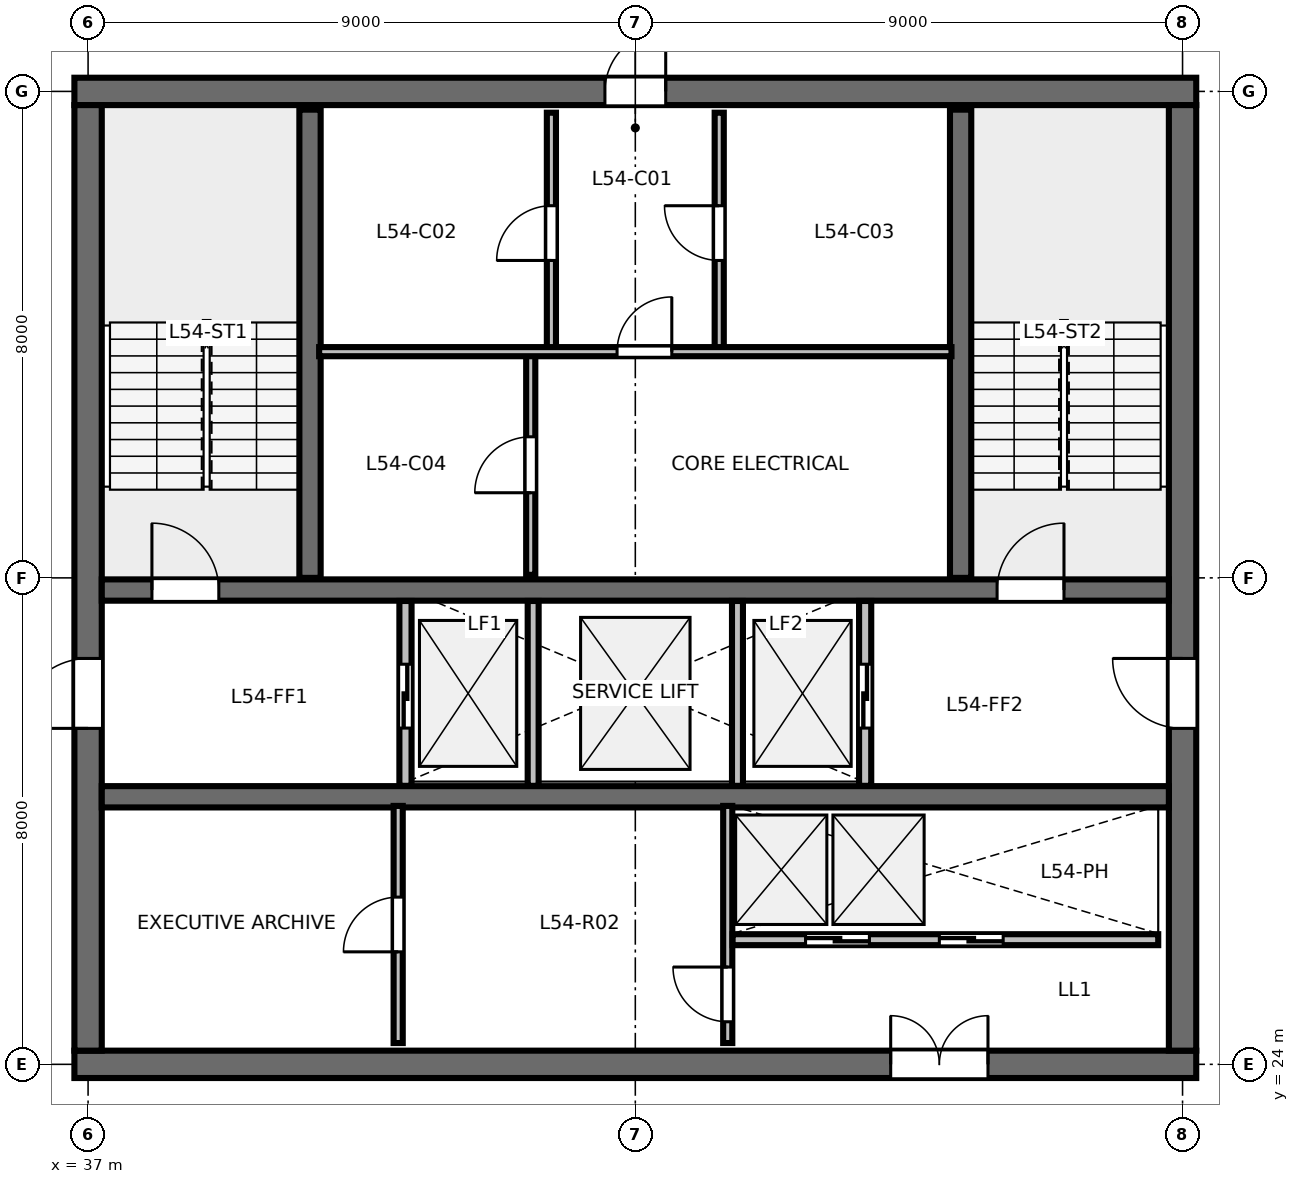
"""IFC4 building model, lengths in metres.
Left out: names, types, materials, properties, quantities, classifications, styles, units other than length and angle.
Written with IfcOpenShell. Run it as: python <this file> out.ifc"""

import sys

from ifc_helpers import new_model, si_unit, direction, frame, frame_2d, origin, place, context, subcontext, project, spatial, rectangle, extrude, element, fill, save


model = new_model("IFC4")
c1 = context("Model", 3, precision=1e-05, world=origin(), true_north=direction((0.0, 1.0)))
c2 = subcontext(c1, "Body", "Model", "MODEL_VIEW")
j1 = project(units=[si_unit("LENGTHUNIT", "METRE"), si_unit("PLANEANGLEUNIT", "RADIAN")], contexts=[c1])
p1 = place(None, origin())
s1 = spatial("IfcSite", under=j1, at=p1, CompositionType="ELEMENT")
p2 = place(p1, origin())
s2 = spatial("IfcBuilding", under=s1, at=p2, CompositionType="ELEMENT")
p3 = place(p2, frame((0.0, 0.0, 205.8)))
s3 = spatial("IfcBuildingStorey", under=s2, at=p3, CompositionType="ELEMENT", Elevation=205.8)
p4 = place(p3, frame((36.775, 24.0, 0.0), z_axis=(0.0, 0.0, 1.0), x_axis=(1.0, 0.0, 0.0)))
e1 = element("IfcWall", 1, at=p4, inside=s3, PredefinedType="SHEAR", context=c2, shape_type="SweptSolid", body=[
    extrude(rectangle(XDim=18.45, YDim=0.45, at=frame_2d((9.225, 0.0))), origin(), (0.0, 0.0, 1.0), 3.36),
])
p5 = place(p4, frame((13.425, 0.0, 0.0)))
e2 = element("IfcOpeningElement", 2, at=p5, cuts=e1, PredefinedType="OPENING", context=c2, shape_type="SweptSolid", body=[
    extrude(rectangle(XDim=1.6, YDim=2.15, at=frame_2d((0.8, 1.075))), frame((0.0, 0.235, 0.0), z_axis=(0.0, -1.0, 0.0), x_axis=(1.0, 0.0, 0.0)), (0.0, 0.0, 1.0), 0.47),
])
p6 = place(p3, frame((36.775, 40.0, 0.0), z_axis=(0.0, 0.0, 1.0), x_axis=(1.0, 0.0, 0.0)))
e3 = element("IfcWall", 3, at=p6, inside=s3, PredefinedType="SHEAR", context=c2, shape_type="SweptSolid", body=[
    extrude(rectangle(XDim=18.45, YDim=0.45, at=frame_2d((9.225, 0.0))), origin(), (0.0, 0.0, 1.0), 3.36),
])
p7 = place(p6, frame((8.725, 0.0, 0.0)))
e4 = element("IfcOpeningElement", 4, at=p7, cuts=e3, PredefinedType="OPENING", context=c2, shape_type="SweptSolid", body=[
    extrude(rectangle(XDim=1.0, YDim=2.15, at=frame_2d((0.5, 1.075))), frame((0.0, 0.235, 0.0), z_axis=(0.0, -1.0, 0.0), x_axis=(1.0, 0.0, 0.0)), (0.0, 0.0, 1.0), 0.47),
])
p8 = place(p3, frame((37.0, 24.225, 0.0), z_axis=(0.0, 0.0, 1.0), x_axis=(0.0, 1.0, 0.0)))
e5 = element("IfcWall", 5, at=p8, inside=s3, PredefinedType="SHEAR", context=c2, shape_type="SweptSolid", body=[
    extrude(rectangle(XDim=15.55, YDim=0.45, at=frame_2d((7.775, 0.0))), origin(), (0.0, 0.0, 1.0), 3.36),
])
p9 = place(p8, frame((5.3, 0.0, 0.0)))
e6 = element("IfcOpeningElement", 6, at=p9, cuts=e5, PredefinedType="OPENING", context=c2, shape_type="SweptSolid", body=[
    extrude(rectangle(XDim=1.15, YDim=2.15, at=frame_2d((0.575, 1.075))), frame((0.0, 0.235, 0.0), z_axis=(0.0, -1.0, 0.0), x_axis=(1.0, 0.0, 0.0)), (0.0, 0.0, 1.0), 0.47),
])
p10 = place(p3, frame((55.0, 24.225, 0.0), z_axis=(0.0, 0.0, 1.0), x_axis=(0.0, 1.0, 0.0)))
e7 = element("IfcWall", 7, at=p10, inside=s3, PredefinedType="SHEAR", context=c2, shape_type="SweptSolid", body=[
    extrude(rectangle(XDim=15.55, YDim=0.45, at=frame_2d((7.775, 0.0))), origin(), (0.0, 0.0, 1.0), 3.36),
])
p11 = place(p10, frame((5.3, 0.0, 0.0)))
e8 = element("IfcOpeningElement", 8, at=p11, cuts=e7, PredefinedType="OPENING", context=c2, shape_type="SweptSolid", body=[
    extrude(rectangle(XDim=1.15, YDim=2.15, at=frame_2d((0.575, 1.075))), frame((0.0, 0.235, 0.0), z_axis=(0.0, -1.0, 0.0), x_axis=(1.0, 0.0, 0.0)), (0.0, 0.0, 1.0), 0.47),
])
p12 = place(p3, frame((37.225, 31.8, 0.0), z_axis=(0.0, 0.0, 1.0), x_axis=(1.0, 0.0, 0.0)))
e9 = element("IfcWall", 9, at=p12, inside=s3, PredefinedType="SHEAR", context=c2, shape_type="SweptSolid", body=[
    extrude(rectangle(XDim=17.55, YDim=0.35, at=frame_2d((8.775, 0.0))), origin(), (0.0, 0.0, 1.0), 3.36),
])
p13 = place(p12, frame((0.825, 0.0, 0.0)))
e10 = element("IfcOpeningElement", 10, at=p13, cuts=e9, PredefinedType="OPENING", context=c2, shape_type="SweptSolid", body=[
    extrude(rectangle(XDim=1.1, YDim=2.15, at=frame_2d((0.55, 1.075))), frame((0.0, 0.185, 0.0), z_axis=(0.0, -1.0, 0.0), x_axis=(1.0, 0.0, 0.0)), (0.0, 0.0, 1.0), 0.37),
])
p14 = place(p12, frame((14.725, 0.0, 0.0)))
e11 = element("IfcOpeningElement", 11, at=p14, cuts=e9, PredefinedType="OPENING", context=c2, shape_type="SweptSolid", body=[
    extrude(rectangle(XDim=1.1, YDim=2.15, at=frame_2d((0.55, 1.075))), frame((0.0, 0.185, 0.0), z_axis=(0.0, -1.0, 0.0), x_axis=(1.0, 0.0, 0.0)), (0.0, 0.0, 1.0), 0.37),
])
p15 = place(p3, frame((37.225, 28.4, 0.0), z_axis=(0.0, 0.0, 1.0), x_axis=(1.0, 0.0, 0.0)))
e12 = element("IfcWall", 12, at=p15, inside=s3, PredefinedType="SHEAR", context=c2, shape_type="SweptSolid", body=[
    extrude(rectangle(XDim=17.55, YDim=0.35, at=frame_2d((8.775, 0.0))), origin(), (0.0, 0.0, 1.0), 3.36),
])
for number, where, z_axis, x_axis in (
    (13, (40.65, 32.0, 0.0), (0.0, 0.0, 1.0), (0.0, 1.0, 0.0)),
    (14, (51.35, 32.0, 0.0), (0.0, 0.0, 1.0), (0.0, 1.0, 0.0)),
):
    element("IfcWall", number, at=place(p3, frame(where, z_axis=z_axis, x_axis=x_axis)), inside=s3, PredefinedType="SHEAR", context=c2, shape_type="SweptSolid", body=[
        extrude(rectangle(XDim=7.7, YDim=0.35, at=frame_2d((3.85, 0.0))), origin(), (0.0, 0.0, 1.0), 3.6),
    ])
p16 = place(p3, frame((44.62, 35.72, 0.0), z_axis=(0.0, 0.0, 1.0), x_axis=(0.0, 1.0, 0.0)))
e15 = element("IfcWall", 15, at=p16, inside=s3, PredefinedType="PARTITIONING", context=c2, shape_type="SweptSolid", body=[
    extrude(rectangle(XDim=3.93, YDim=0.15, at=frame_2d((1.965, 0.0))), origin(), (0.0, 0.0, 1.0), 3.375),
])
p17 = place(p16, frame((1.5, 0.0, 0.0)))
e16 = element("IfcOpeningElement", 16, at=p17, cuts=e15, PredefinedType="OPENING", context=c2, shape_type="SweptSolid", body=[
    extrude(rectangle(XDim=0.9, YDim=2.15, at=frame_2d((0.45, 1.075))), frame((0.0, 0.085, 0.0), z_axis=(0.0, -1.0, 0.0), x_axis=(1.0, 0.0, 0.0)), (0.0, 0.0, 1.0), 0.17),
])
p18 = place(p3, frame((47.38, 35.72, 0.0), z_axis=(0.0, 0.0, 1.0), x_axis=(0.0, 1.0, 0.0)))
e17 = element("IfcWall", 17, at=p18, inside=s3, PredefinedType="PARTITIONING", context=c2, shape_type="SweptSolid", body=[
    extrude(rectangle(XDim=3.93, YDim=0.15, at=frame_2d((1.965, 0.0))), origin(), (0.0, 0.0, 1.0), 3.375),
])
p19 = place(p18, frame((1.5, 0.0, 0.0)))
e18 = element("IfcOpeningElement", 18, at=p19, cuts=e17, PredefinedType="OPENING", context=c2, shape_type="SweptSolid", body=[
    extrude(rectangle(XDim=0.9, YDim=2.15, at=frame_2d((0.45, 1.075))), frame((0.0, 0.085, 0.0), z_axis=(0.0, -1.0, 0.0), x_axis=(1.0, 0.0, 0.0)), (0.0, 0.0, 1.0), 0.17),
])
p20 = place(p3, frame((44.28, 32.05, 0.0), z_axis=(0.0, 0.0, 1.0), x_axis=(0.0, 1.0, 0.0)))
e19 = element("IfcWall", 19, at=p20, inside=s3, PredefinedType="PARTITIONING", context=c2, shape_type="SweptSolid", body=[
    extrude(rectangle(XDim=3.67, YDim=0.15, at=frame_2d((1.835, 0.0))), origin(), (0.0, 0.0, 1.0), 3.375),
])
p21 = place(p20, frame((1.35, 0.0, 0.0)))
e20 = element("IfcOpeningElement", 20, at=p21, cuts=e19, PredefinedType="OPENING", context=c2, shape_type="SweptSolid", body=[
    extrude(rectangle(XDim=0.92, YDim=2.15, at=frame_2d((0.46, 1.075))), frame((0.0, 0.085, 0.0), z_axis=(0.0, -1.0, 0.0), x_axis=(1.0, 0.0, 0.0)), (0.0, 0.0, 1.0), 0.17),
])
p22 = place(p3, frame((40.8, 35.72, 0.0), z_axis=(0.0, 0.0, 1.0), x_axis=(1.0, 0.0, 0.0)))
e21 = element("IfcWall", 21, at=p22, inside=s3, PredefinedType="PARTITIONING", context=c2, shape_type="SweptSolid", body=[
    extrude(rectangle(XDim=10.4, YDim=0.15, at=frame_2d((5.2, 0.0))), origin(), (0.0, 0.0, 1.0), 3.375),
])
p23 = place(p22, frame((4.9, 0.0, 0.0)))
e22 = element("IfcOpeningElement", 22, at=p23, cuts=e21, PredefinedType="OPENING", context=c2, shape_type="SweptSolid", body=[
    extrude(rectangle(XDim=0.9, YDim=2.15, at=frame_2d((0.45, 1.075))), frame((0.0, 0.085, 0.0), z_axis=(0.0, -1.0, 0.0), x_axis=(1.0, 0.0, 0.0)), (0.0, 0.0, 1.0), 0.17),
])
p24 = place(p3, frame((42.22, 28.58, 0.0), z_axis=(0.0, 0.0, 1.0), x_axis=(0.0, 1.0, 0.0)))
e23 = element("IfcWall", 23, at=p24, inside=s3, PredefinedType="PARTITIONING", context=c2, shape_type="SweptSolid", body=[
    extrude(rectangle(XDim=3.04, YDim=0.2, at=frame_2d((1.52, 0.0))), origin(), (0.0, 0.0, 1.0), 3.375),
])
p25 = place(p24, frame((0.95, 0.0, 0.0)))
e24 = element("IfcOpeningElement", 24, at=p25, cuts=e23, PredefinedType="OPENING", context=c2, shape_type="SweptSolid", body=[
    extrude(rectangle(XDim=1.05, YDim=2.15, at=frame_2d((0.525, 1.075))), frame((0.0, 0.11, 0.0), z_axis=(0.0, -1.0, 0.0), x_axis=(1.0, 0.0, 0.0)), (0.0, 0.0, 1.0), 0.22),
])
p26 = place(p3, frame((49.78, 28.58, 0.0), z_axis=(0.0, 0.0, 1.0), x_axis=(0.0, 1.0, 0.0)))
e25 = element("IfcWall", 25, at=p26, inside=s3, PredefinedType="PARTITIONING", context=c2, shape_type="SweptSolid", body=[
    extrude(rectangle(XDim=3.04, YDim=0.2, at=frame_2d((1.52, 0.0))), origin(), (0.0, 0.0, 1.0), 3.375),
])
p27 = place(p26, frame((0.95, 0.0, 0.0)))
e26 = element("IfcOpeningElement", 26, at=p27, cuts=e25, PredefinedType="OPENING", context=c2, shape_type="SweptSolid", body=[
    extrude(rectangle(XDim=1.05, YDim=2.15, at=frame_2d((0.525, 1.075))), frame((0.0, 0.11, 0.0), z_axis=(0.0, -1.0, 0.0), x_axis=(1.0, 0.0, 0.0)), (0.0, 0.0, 1.0), 0.22),
])
for number, where, z_axis, x_axis in (
    (27, (44.32, 28.58, 0.0), (0.0, 0.0, 1.0), (0.0, 1.0, 0.0)),
    (28, (47.68, 28.58, 0.0), (0.0, 0.0, 1.0), (0.0, 1.0, 0.0)),
):
    element("IfcWall", number, at=place(p3, frame(where, z_axis=z_axis, x_axis=x_axis)), inside=s3, PredefinedType="PARTITIONING", context=c2, shape_type="SweptSolid", body=[
        extrude(rectangle(XDim=3.04, YDim=0.18, at=frame_2d((1.52, 0.0))), origin(), (0.0, 0.0, 1.0), 3.375),
    ])
p28 = place(p3, frame((42.1, 24.35, 0.0), z_axis=(0.0, 0.0, 1.0), x_axis=(0.0, 1.0, 0.0)))
e29 = element("IfcWall", 29, at=p28, inside=s3, PredefinedType="PARTITIONING", context=c2, shape_type="SweptSolid", body=[
    extrude(rectangle(XDim=3.9, YDim=0.15, at=frame_2d((1.95, 0.0))), origin(), (0.0, 0.0, 1.0), 3.375),
])
p29 = place(p28, frame((1.5, 0.0, 0.0)))
e30 = element("IfcOpeningElement", 30, at=p29, cuts=e29, PredefinedType="OPENING", context=c2, shape_type="SweptSolid", body=[
    extrude(rectangle(XDim=0.9, YDim=2.15, at=frame_2d((0.45, 1.075))), frame((0.0, 0.085, 0.0), z_axis=(0.0, -1.0, 0.0), x_axis=(1.0, 0.0, 0.0)), (0.0, 0.0, 1.0), 0.17),
])
p30 = place(p3, frame((47.52, 24.35, 0.0), z_axis=(0.0, 0.0, 1.0), x_axis=(0.0, 1.0, 0.0)))
e31 = element("IfcWall", 31, at=p30, inside=s3, PredefinedType="PARTITIONING", context=c2, shape_type="SweptSolid", body=[
    extrude(rectangle(XDim=3.9, YDim=0.15, at=frame_2d((1.95, 0.0))), origin(), (0.0, 0.0, 1.0), 3.375),
])
p31 = place(p30, frame((0.35, 0.0, 0.0)))
e32 = element("IfcOpeningElement", 32, at=p31, cuts=e31, PredefinedType="OPENING", context=c2, shape_type="SweptSolid", body=[
    extrude(rectangle(XDim=0.9, YDim=2.15, at=frame_2d((0.45, 1.075))), frame((0.0, 0.085, 0.0), z_axis=(0.0, -1.0, 0.0), x_axis=(1.0, 0.0, 0.0)), (0.0, 0.0, 1.0), 0.17),
])
p32 = place(p3, frame((47.6, 26.05, 0.0), z_axis=(0.0, 0.0, 1.0), x_axis=(1.0, 0.0, 0.0)))
e33 = element("IfcWall", 33, at=p32, inside=s3, PredefinedType="PARTITIONING", context=c2, shape_type="SweptSolid", body=[
    extrude(rectangle(XDim=7.0, YDim=0.18, at=frame_2d((3.5, 0.0))), origin(), (0.0, 0.0, 1.0), 3.375),
])
p33 = place(p32, frame((1.2, 0.0, 0.0)))
e34 = element("IfcOpeningElement", 34, at=p33, cuts=e33, PredefinedType="OPENING", context=c2, shape_type="SweptSolid", body=[
    extrude(rectangle(XDim=1.05, YDim=2.15, at=frame_2d((0.525, 1.075))), frame((0.0, 0.1, 0.0), z_axis=(0.0, -1.0, 0.0), x_axis=(1.0, 0.0, 0.0)), (0.0, 0.0, 1.0), 0.2),
])
p34 = place(p32, frame((3.4, 0.0, 0.0)))
e35 = element("IfcOpeningElement", 35, at=p34, cuts=e33, PredefinedType="OPENING", context=c2, shape_type="SweptSolid", body=[
    extrude(rectangle(XDim=1.05, YDim=2.15, at=frame_2d((0.525, 1.075))), frame((0.0, 0.1, 0.0), z_axis=(0.0, -1.0, 0.0), x_axis=(1.0, 0.0, 0.0)), (0.0, 0.0, 1.0), 0.2),
])
p35 = place(p13, origin())
e36 = element("IfcDoor", 36, at=p35, inside=s3, OperationType="SINGLE_SWING_LEFT", PredefinedType="DOOR", context=c2, shape_type="SweptSolid", body=[
    extrude(rectangle(XDim=1.1, YDim=2.15, at=frame_2d((0.55, 1.075))), frame((0.0, 0.025, 0.0), z_axis=(0.0, -1.0, 0.0), x_axis=(1.0, 0.0, 0.0)), (0.0, 0.0, 1.0), 0.05),
])
fill(e10, e36)
p36 = place(p14, origin())
e37 = element("IfcDoor", 37, at=p36, inside=s3, OperationType="SINGLE_SWING_RIGHT", PredefinedType="DOOR", context=c2, shape_type="SweptSolid", body=[
    extrude(rectangle(XDim=1.1, YDim=2.15, at=frame_2d((0.55, 1.075))), frame((0.0, 0.025, 0.0), z_axis=(0.0, -1.0, 0.0), x_axis=(1.0, 0.0, 0.0)), (0.0, 0.0, 1.0), 0.05),
])
fill(e11, e37)
p37 = place(p7, origin())
e38 = element("IfcDoor", 38, at=p37, inside=s3, OperationType="SINGLE_SWING_RIGHT", PredefinedType="DOOR", context=c2, shape_type="SweptSolid", body=[
    extrude(rectangle(XDim=1.0, YDim=2.15, at=frame_2d((0.5, 1.075))), frame((0.0, 0.025, 0.0), z_axis=(0.0, -1.0, 0.0), x_axis=(1.0, 0.0, 0.0)), (0.0, 0.0, 1.0), 0.05),
])
fill(e4, e38)
p38 = place(p9, origin())
e39 = element("IfcDoor", 39, at=p38, inside=s3, OperationType="SINGLE_SWING_LEFT", PredefinedType="DOOR", context=c2, shape_type="SweptSolid", body=[
    extrude(rectangle(XDim=1.15, YDim=2.15, at=frame_2d((0.575, 1.075))), frame((0.0, 0.025, 0.0), z_axis=(0.0, -1.0, 0.0), x_axis=(1.0, 0.0, 0.0)), (0.0, 0.0, 1.0), 0.05),
])
fill(e6, e39)
p39 = place(p11, origin())
e40 = element("IfcDoor", 40, at=p39, inside=s3, OperationType="SINGLE_SWING_RIGHT", PredefinedType="DOOR", context=c2, shape_type="SweptSolid", body=[
    extrude(rectangle(XDim=1.15, YDim=2.15, at=frame_2d((0.575, 1.075))), frame((0.0, 0.025, 0.0), z_axis=(0.0, -1.0, 0.0), x_axis=(1.0, 0.0, 0.0)), (0.0, 0.0, 1.0), 0.05),
])
fill(e8, e40)
p40 = place(p5, origin())
e41 = element("IfcDoor", 41, at=p40, inside=s3, OperationType="DOUBLE_DOOR_SINGLE_SWING", PredefinedType="DOOR", context=c2, shape_type="SweptSolid", body=[
    extrude(rectangle(XDim=1.6, YDim=2.15, at=frame_2d((0.8, 1.075))), frame((0.0, 0.025, 0.0), z_axis=(0.0, -1.0, 0.0), x_axis=(1.0, 0.0, 0.0)), (0.0, 0.0, 1.0), 0.05),
])
fill(e2, e41)
p41 = place(p17, origin())
e42 = element("IfcDoor", 42, at=p41, inside=s3, OperationType="SINGLE_SWING_LEFT", PredefinedType="DOOR", context=c2, shape_type="SweptSolid", body=[
    extrude(rectangle(XDim=0.9, YDim=2.15, at=frame_2d((0.45, 1.075))), frame((0.0, 0.025, 0.0), z_axis=(0.0, -1.0, 0.0), x_axis=(1.0, 0.0, 0.0)), (0.0, 0.0, 1.0), 0.05),
])
fill(e16, e42)
p42 = place(p19, origin())
e43 = element("IfcDoor", 43, at=p42, inside=s3, OperationType="SINGLE_SWING_RIGHT", PredefinedType="DOOR", context=c2, shape_type="SweptSolid", body=[
    extrude(rectangle(XDim=0.9, YDim=2.15, at=frame_2d((0.45, 1.075))), frame((0.0, 0.025, 0.0), z_axis=(0.0, -1.0, 0.0), x_axis=(1.0, 0.0, 0.0)), (0.0, 0.0, 1.0), 0.05),
])
fill(e18, e43)
p43 = place(p21, origin())
e44 = element("IfcDoor", 44, at=p43, inside=s3, OperationType="SINGLE_SWING_LEFT", PredefinedType="DOOR", context=c2, shape_type="SweptSolid", body=[
    extrude(rectangle(XDim=0.92, YDim=2.15, at=frame_2d((0.46, 1.075))), frame((0.0, 0.025, 0.0), z_axis=(0.0, -1.0, 0.0), x_axis=(1.0, 0.0, 0.0)), (0.0, 0.0, 1.0), 0.05),
])
fill(e20, e44)
p44 = place(p23, origin())
e45 = element("IfcDoor", 45, at=p44, inside=s3, OperationType="SINGLE_SWING_RIGHT", PredefinedType="DOOR", context=c2, shape_type="SweptSolid", body=[
    extrude(rectangle(XDim=0.9, YDim=2.15, at=frame_2d((0.45, 1.075))), frame((0.0, 0.025, 0.0), z_axis=(0.0, -1.0, 0.0), x_axis=(1.0, 0.0, 0.0)), (0.0, 0.0, 1.0), 0.05),
])
fill(e22, e45)
p45 = place(p25, origin())
e46 = element("IfcDoor", 46, at=p45, inside=s3, OperationType="SLIDING_TO_LEFT", PredefinedType="DOOR", context=c2, shape_type="SweptSolid", body=[
    extrude(rectangle(XDim=1.05, YDim=2.15, at=frame_2d((0.525, 1.075))), frame((0.0, 0.025, 0.0), z_axis=(0.0, -1.0, 0.0), x_axis=(1.0, 0.0, 0.0)), (0.0, 0.0, 1.0), 0.05),
])
fill(e24, e46)
p46 = place(p27, origin())
e47 = element("IfcDoor", 47, at=p46, inside=s3, OperationType="SLIDING_TO_RIGHT", PredefinedType="DOOR", context=c2, shape_type="SweptSolid", body=[
    extrude(rectangle(XDim=1.05, YDim=2.15, at=frame_2d((0.525, 1.075))), frame((0.0, 0.025, 0.0), z_axis=(0.0, -1.0, 0.0), x_axis=(1.0, 0.0, 0.0)), (0.0, 0.0, 1.0), 0.05),
])
fill(e26, e47)
p47 = place(p29, origin())
e48 = element("IfcDoor", 48, at=p47, inside=s3, OperationType="SINGLE_SWING_LEFT", PredefinedType="DOOR", context=c2, shape_type="SweptSolid", body=[
    extrude(rectangle(XDim=0.9, YDim=2.15, at=frame_2d((0.45, 1.075))), frame((0.0, 0.025, 0.0), z_axis=(0.0, -1.0, 0.0), x_axis=(1.0, 0.0, 0.0)), (0.0, 0.0, 1.0), 0.05),
])
fill(e30, e48)
p48 = place(p31, origin())
e49 = element("IfcDoor", 49, at=p48, inside=s3, OperationType="SINGLE_SWING_RIGHT", PredefinedType="DOOR", context=c2, shape_type="SweptSolid", body=[
    extrude(rectangle(XDim=0.9, YDim=2.15, at=frame_2d((0.45, 1.075))), frame((0.0, 0.025, 0.0), z_axis=(0.0, -1.0, 0.0), x_axis=(1.0, 0.0, 0.0)), (0.0, 0.0, 1.0), 0.05),
])
fill(e32, e49)
p49 = place(p33, origin())
e50 = element("IfcDoor", 50, at=p49, inside=s3, OperationType="SLIDING_TO_LEFT", PredefinedType="DOOR", context=c2, shape_type="SweptSolid", body=[
    extrude(rectangle(XDim=1.05, YDim=2.15, at=frame_2d((0.525, 1.075))), frame((0.0, 0.025, 0.0), z_axis=(0.0, -1.0, 0.0), x_axis=(1.0, 0.0, 0.0)), (0.0, 0.0, 1.0), 0.05),
])
fill(e34, e50)
p50 = place(p34, origin())
e51 = element("IfcDoor", 51, at=p50, inside=s3, OperationType="SLIDING_TO_RIGHT", PredefinedType="DOOR", context=c2, shape_type="SweptSolid", body=[
    extrude(rectangle(XDim=1.05, YDim=2.15, at=frame_2d((0.525, 1.075))), frame((0.0, 0.025, 0.0), z_axis=(0.0, -1.0, 0.0), x_axis=(1.0, 0.0, 0.0)), (0.0, 0.0, 1.0), 0.05),
])
fill(e35, e51)
save(model, sys.argv[1])
